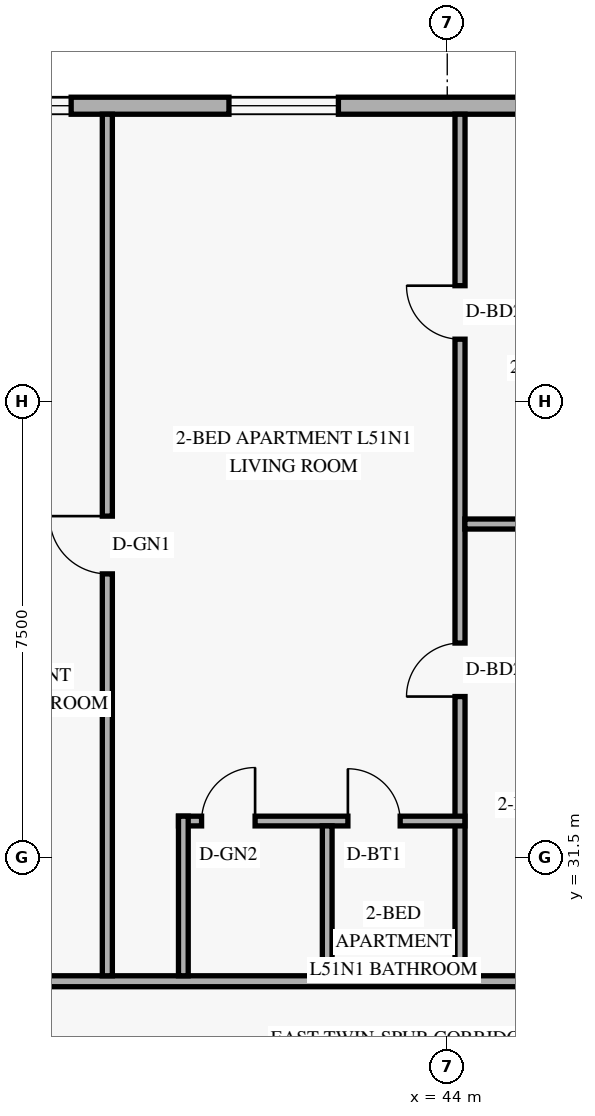
"""IFC4 building model, lengths in metres.
Left out: names, types, materials, properties, quantities, classifications, styles, units other than length and angle.
Written with IfcOpenShell. Run it as: python <this file> out.ifc"""

import sys

from ifc_helpers import new_model, si_unit, direction, frame, frame_2d, origin, place, context, subcontext, project, spatial, rectangle, extrude, element, fill, save


model = new_model("IFC4")
c1 = context("Model", 3, precision=1e-05, world=origin(), true_north=direction((0.0, 1.0)))
c2 = subcontext(c1, "Body", "Model", "MODEL_VIEW")
j1 = project(units=[si_unit("LENGTHUNIT", "METRE"), si_unit("PLANEANGLEUNIT", "RADIAN")], contexts=[c1])
p1 = place(None, origin())
s1 = spatial("IfcSite", under=j1, at=p1, CompositionType="ELEMENT")
p2 = place(p1, origin())
s2 = spatial("IfcBuilding", under=s1, at=p2, CompositionType="ELEMENT")
p3 = place(p2, frame((0.0, 0.0, 196.2)))
s3 = spatial("IfcBuildingStorey", under=s2, at=p3, CompositionType="ELEMENT", Elevation=196.2)
p4 = place(p3, frame((54.98, 43.86, 0.0), z_axis=(0.0, 0.0, 1.0), x_axis=(-1.0, 0.0, 0.0)))
e1 = element("IfcWall", 1, at=p4, inside=s3, PredefinedType="SOLIDWALL", context=c2, shape_type="SweptSolid", body=[
    extrude(rectangle(XDim=33.76, YDim=0.28, at=frame_2d((16.88, 0.0))), origin(), (0.0, 0.0, 1.0), 3.3),
])
p5 = place(p4, frame((28.055, 0.0, 0.85)))
e2 = element("IfcOpeningElement", 2, at=p5, cuts=e1, PredefinedType="OPENING", context=c2, shape_type="SweptSolid", body=[
    extrude(rectangle(XDim=1.8, YDim=1.6, at=frame_2d((0.9, 0.8))), frame((0.0, 0.15, 0.0), z_axis=(0.0, -1.0, 0.0), x_axis=(1.0, 0.0, 0.0)), (0.0, 0.0, 1.0), 0.3),
])
p6 = place(p4, frame((21.17, 0.0, 0.85)))
e3 = element("IfcOpeningElement", 3, at=p6, cuts=e1, PredefinedType="OPENING", context=c2, shape_type="SweptSolid", body=[
    extrude(rectangle(XDim=1.8, YDim=1.6, at=frame_2d((0.9, 0.8))), frame((0.0, 0.15, 0.0), z_axis=(0.0, -1.0, 0.0), x_axis=(1.0, 0.0, 0.0)), (0.0, 0.0, 1.0), 0.3),
])
p7 = place(p4, frame((17.165, 0.0, 0.85)))
e4 = element("IfcOpeningElement", 4, at=p7, cuts=e1, PredefinedType="OPENING", context=c2, shape_type="SweptSolid", body=[
    extrude(rectangle(XDim=1.8, YDim=1.6, at=frame_2d((0.9, 0.8))), frame((0.0, 0.15, 0.0), z_axis=(0.0, -1.0, 0.0), x_axis=(1.0, 0.0, 0.0)), (0.0, 0.0, 1.0), 0.3),
])
p8 = place(p4, frame((12.77, 0.0, 0.85)))
e5 = element("IfcOpeningElement", 5, at=p8, cuts=e1, PredefinedType="OPENING", context=c2, shape_type="SweptSolid", body=[
    extrude(rectangle(XDim=1.8, YDim=1.6, at=frame_2d((0.9, 0.8))), frame((0.0, 0.15, 0.0), z_axis=(0.0, -1.0, 0.0), x_axis=(1.0, 0.0, 0.0)), (0.0, 0.0, 1.0), 0.3),
])
p9 = place(p4, frame((7.375, 0.0, 0.85)))
e6 = element("IfcOpeningElement", 6, at=p9, cuts=e1, PredefinedType="OPENING", context=c2, shape_type="SweptSolid", body=[
    extrude(rectangle(XDim=1.8, YDim=1.6, at=frame_2d((0.9, 0.8))), frame((0.0, 0.15, 0.0), z_axis=(0.0, -1.0, 0.0), x_axis=(1.0, 0.0, 0.0)), (0.0, 0.0, 1.0), 0.3),
])
p10 = place(p4, frame((4.28, 0.0, 0.85)))
e7 = element("IfcOpeningElement", 7, at=p10, cuts=e1, PredefinedType="OPENING", context=c2, shape_type="SweptSolid", body=[
    extrude(rectangle(XDim=1.2, YDim=1.5, at=frame_2d((0.6, 0.75))), frame((0.0, 0.15, 0.0), z_axis=(0.0, -1.0, 0.0), x_axis=(1.0, 0.0, 0.0)), (0.0, 0.0, 1.0), 0.3),
])
p11 = place(p4, frame((1.09, 0.0, 0.85)))
e8 = element("IfcOpeningElement", 8, at=p11, cuts=e1, PredefinedType="OPENING", context=c2, shape_type="SweptSolid", body=[
    extrude(rectangle(XDim=1.8, YDim=1.6, at=frame_2d((0.9, 0.8))), frame((0.0, 0.15, 0.0), z_axis=(0.0, -1.0, 0.0), x_axis=(1.0, 0.0, 0.0)), (0.0, 0.0, 1.0), 0.3),
])
p12 = place(p3, frame((35.51, 29.46, 0.0), z_axis=(0.0, 0.0, 1.0), x_axis=(1.0, 0.0, 0.0)))
e9 = element("IfcWall", 9, at=p12, inside=s3, PredefinedType="STANDARD", context=c2, shape_type="SweptSolid", body=[
    extrude(rectangle(XDim=13.69, YDim=0.18, at=frame_2d((6.845, 0.0))), origin(), (0.0, 0.0, 1.0), 2.67),
])
p13 = place(p12, frame((0.32, 0.0, 0.0)))
e10 = element("IfcOpeningElement", 10, at=p13, cuts=e9, PredefinedType="OPENING", context=c2, shape_type="SweptSolid", body=[
    extrude(rectangle(XDim=0.92, YDim=2.15, at=frame_2d((0.46, 1.075))), frame((0.0, 0.1, 0.0), z_axis=(0.0, -1.0, 0.0), x_axis=(1.0, 0.0, 0.0)), (0.0, 0.0, 1.0), 0.2),
])
p14 = place(p3, frame((44.21, 29.55, 0.0), z_axis=(0.0, 0.0, 1.0), x_axis=(0.0, 1.0, 0.0)))
e11 = element("IfcWall", 11, at=p14, inside=s3, PredefinedType="PARTITIONING", context=c2, shape_type="SweptSolid", body=[
    extrude(rectangle(XDim=14.17, YDim=0.165, at=frame_2d((7.085, 0.0))), origin(), (0.0, 0.0, 1.0), 2.67),
])
p15 = place(p14, frame((4.593, 0.0, 0.0)))
e12 = element("IfcOpeningElement", 12, at=p15, cuts=e11, PredefinedType="OPENING", context=c2, shape_type="SweptSolid", body=[
    extrude(rectangle(XDim=0.88, YDim=2.14, at=frame_2d((0.44, 1.07))), frame((0.0, 0.093, 0.0), z_axis=(0.0, -1.0, 0.0), x_axis=(1.0, 0.0, 0.0)), (0.0, 0.0, 1.0), 0.185),
])
p16 = place(p14, frame((10.47, 0.0, 0.0)))
e13 = element("IfcOpeningElement", 13, at=p16, cuts=e11, PredefinedType="OPENING", context=c2, shape_type="SweptSolid", body=[
    extrude(rectangle(XDim=0.88, YDim=2.14, at=frame_2d((0.44, 1.07))), frame((0.0, 0.093, 0.0), z_axis=(0.0, -1.0, 0.0), x_axis=(1.0, 0.0, 0.0)), (0.0, 0.0, 1.0), 0.185),
])
p17 = place(p3, frame((39.58, 32.095, 0.0), z_axis=(0.0, 0.0, 1.0), x_axis=(1.0, 0.0, 0.0)))
e14 = element("IfcWall", 14, at=p17, inside=s3, PredefinedType="PLUMBINGWALL", context=c2, shape_type="SweptSolid", body=[
    extrude(rectangle(XDim=4.71, YDim=0.16, at=frame_2d((2.355, 0.0))), origin(), (0.0, 0.0, 1.0), 3.3),
])
p18 = place(p17, frame((0.38, 0.0, 0.0)))
e15 = element("IfcOpeningElement", 15, at=p18, cuts=e14, PredefinedType="OPENING", context=c2, shape_type="SweptSolid", body=[
    extrude(rectangle(XDim=0.88, YDim=2.12, at=frame_2d((0.44, 1.06))), frame((0.0, 0.09, 0.0), z_axis=(0.0, -1.0, 0.0), x_axis=(1.0, 0.0, 0.0)), (0.0, 0.0, 1.0), 0.18),
])
p19 = place(p17, frame((2.786, 0.0, 0.0)))
e16 = element("IfcOpeningElement", 16, at=p19, cuts=e14, PredefinedType="OPENING", context=c2, shape_type="SweptSolid", body=[
    extrude(rectangle(XDim=0.86, YDim=2.12, at=frame_2d((0.43, 1.06))), frame((0.0, 0.09, 0.0), z_axis=(0.0, -1.0, 0.0), x_axis=(1.0, 0.0, 0.0)), (0.0, 0.0, 1.0), 0.18),
])
p20 = place(p3, frame((39.66, 29.55, 0.0), z_axis=(0.0, 0.0, 1.0), x_axis=(0.0, 1.0, 0.0)))
e17 = element("IfcWall", 17, at=p20, inside=s3, PredefinedType="PLUMBINGWALL", context=c2, shape_type="SweptSolid", body=[
    extrude(rectangle(XDim=2.625, YDim=0.16, at=frame_2d((1.312, 0.0))), origin(), (0.0, 0.0, 1.0), 2.67),
])
p21 = place(p3, frame((42.026, 29.55, 0.0), z_axis=(0.0, 0.0, 1.0), x_axis=(0.0, 1.0, 0.0)))
e18 = element("IfcWall", 18, at=p21, inside=s3, PredefinedType="PLUMBINGWALL", context=c2, shape_type="SweptSolid", body=[
    extrude(rectangle(XDim=2.465, YDim=0.16, at=frame_2d((1.232, 0.0))), origin(), (0.0, 0.0, 1.0), 2.67),
])
p22 = place(p3, frame((38.41, 29.55, 0.0), z_axis=(0.0, 0.0, 1.0), x_axis=(0.0, 1.0, 0.0)))
e19 = element("IfcWall", 19, at=p22, inside=s3, PredefinedType="PARTITIONING", context=c2, shape_type="SweptSolid", body=[
    extrude(rectangle(XDim=14.17, YDim=0.165, at=frame_2d((7.085, 0.0))), origin(), (0.0, 0.0, 1.0), 2.67),
])
p23 = place(p22, frame((6.61, 0.0, 0.0)))
e20 = element("IfcOpeningElement", 20, at=p23, cuts=e19, PredefinedType="OPENING", context=c2, shape_type="SweptSolid", body=[
    extrude(rectangle(XDim=0.95, YDim=2.15, at=frame_2d((0.475, 1.075))), frame((0.0, 0.093, 0.0), z_axis=(0.0, -1.0, 0.0), x_axis=(1.0, 0.0, 0.0)), (0.0, 0.0, 1.0), 0.185),
])
p24 = place(p3, frame((44.29, 36.98, 0.0), z_axis=(0.0, 0.0, 1.0), x_axis=(1.0, 0.0, 0.0)))
e21 = element("IfcWall", 21, at=p24, inside=s3, PredefinedType="PARTITIONING", context=c2, shape_type="SweptSolid", body=[
    extrude(rectangle(XDim=4.82, YDim=0.165, at=frame_2d((2.41, 0.0))), origin(), (0.0, 0.0, 1.0), 2.67),
])
p25 = place(p7, origin())
e22 = element("IfcWindow", 22, at=p25, inside=s3, PartitioningType="SINGLE_PANEL", PredefinedType="WINDOW", context=c2, shape_type="SweptSolid", body=[
    extrude(rectangle(XDim=1.8, YDim=1.6, at=frame_2d((0.9, 0.8))), frame((0.0, 0.03, 0.0), z_axis=(0.0, -1.0, 0.0), x_axis=(1.0, 0.0, 0.0)), (0.0, 0.0, 1.0), 0.06),
])
fill(e4, e22)
p26 = place(p8, origin())
e23 = element("IfcWindow", 23, at=p26, inside=s3, PartitioningType="SINGLE_PANEL", PredefinedType="WINDOW", context=c2, shape_type="SweptSolid", body=[
    extrude(rectangle(XDim=1.8, YDim=1.6, at=frame_2d((0.9, 0.8))), frame((0.0, 0.03, 0.0), z_axis=(0.0, -1.0, 0.0), x_axis=(1.0, 0.0, 0.0)), (0.0, 0.0, 1.0), 0.06),
])
fill(e5, e23)
p27 = place(p23, origin())
e24 = element("IfcDoor", 24, at=p27, inside=s3, OperationType="SINGLE_SWING_RIGHT", PredefinedType="DOOR", context=c2, shape_type="SweptSolid", body=[
    extrude(rectangle(XDim=0.95, YDim=2.15, at=frame_2d((0.475, 1.075))), frame((0.0, 0.025, 0.0), z_axis=(0.0, -1.0, 0.0), x_axis=(1.0, 0.0, 0.0)), (0.0, 0.0, 1.0), 0.05),
])
fill(e20, e24)
p28 = place(p18, origin())
e25 = element("IfcDoor", 25, at=p28, inside=s3, OperationType="SINGLE_SWING_RIGHT", PredefinedType="DOOR", context=c2, shape_type="SweptSolid", body=[
    extrude(rectangle(XDim=0.88, YDim=2.12, at=frame_2d((0.44, 1.06))), frame((0.0, 0.025, 0.0), z_axis=(0.0, -1.0, 0.0), x_axis=(1.0, 0.0, 0.0)), (0.0, 0.0, 1.0), 0.05),
])
fill(e15, e25)
p29 = place(p19, origin())
e26 = element("IfcDoor", 26, at=p29, inside=s3, OperationType="SINGLE_SWING_LEFT", PredefinedType="DOOR", context=c2, shape_type="SweptSolid", body=[
    extrude(rectangle(XDim=0.86, YDim=2.12, at=frame_2d((0.43, 1.06))), frame((0.0, 0.025, 0.0), z_axis=(0.0, -1.0, 0.0), x_axis=(1.0, 0.0, 0.0)), (0.0, 0.0, 1.0), 0.05),
])
fill(e16, e26)
p30 = place(p15, origin())
e27 = element("IfcDoor", 27, at=p30, inside=s3, OperationType="SINGLE_SWING_LEFT", PredefinedType="DOOR", context=c2, shape_type="SweptSolid", body=[
    extrude(rectangle(XDim=0.88, YDim=2.14, at=frame_2d((0.44, 1.07))), frame((0.0, 0.025, 0.0), z_axis=(0.0, -1.0, 0.0), x_axis=(1.0, 0.0, 0.0)), (0.0, 0.0, 1.0), 0.05),
])
fill(e12, e27)
p31 = place(p16, origin())
e28 = element("IfcDoor", 28, at=p31, inside=s3, OperationType="SINGLE_SWING_RIGHT", PredefinedType="DOOR", context=c2, shape_type="SweptSolid", body=[
    extrude(rectangle(XDim=0.88, YDim=2.14, at=frame_2d((0.44, 1.07))), frame((0.0, 0.025, 0.0), z_axis=(0.0, -1.0, 0.0), x_axis=(1.0, 0.0, 0.0)), (0.0, 0.0, 1.0), 0.05),
])
fill(e13, e28)
save(model, sys.argv[1])
